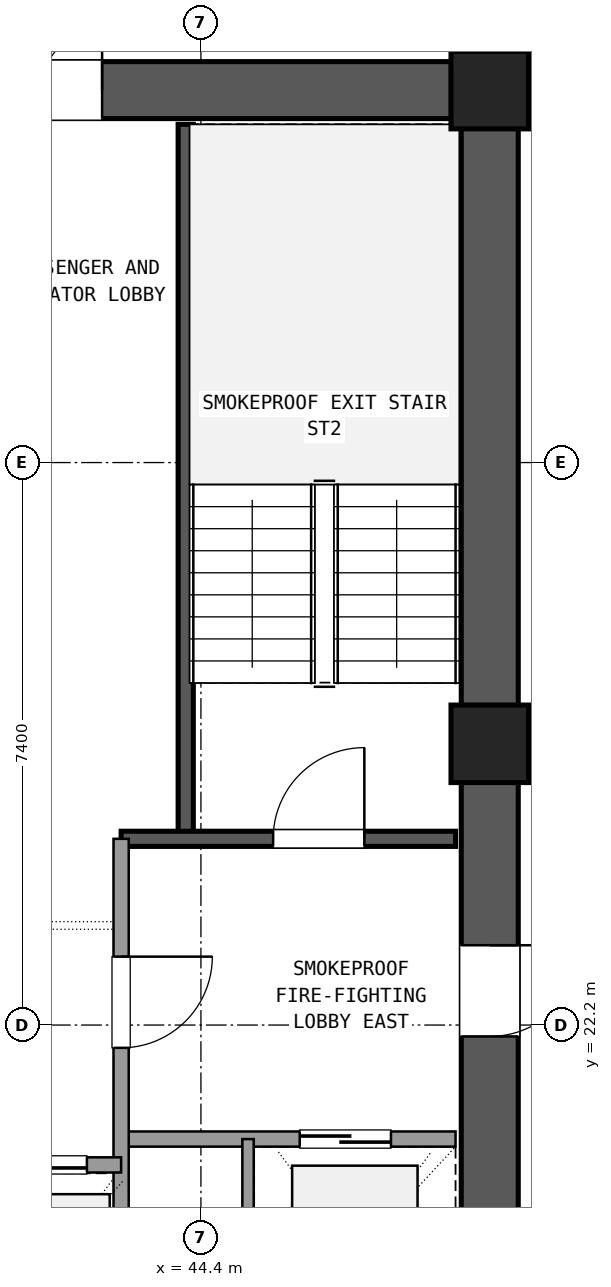
"""IFC4 building model, lengths in metres.
Left out: names, types, materials, properties, quantities, classifications, styles, units other than length and angle.
Written with IfcOpenShell. Run it as: python <this file> out.ifc"""

import sys

from ifc_helpers import new_model, si_unit, direction, frame, frame_2d, origin, origin_2d, place, context, subcontext, project, spatial, rectangle, extrude, element, fill, save


model = new_model("IFC4")
c1 = context("Model", 3, precision=1e-05, world=origin(), true_north=direction((0.0, 1.0)))
c2 = subcontext(c1, "Body", "Model", "MODEL_VIEW")
j1 = project(units=[si_unit("LENGTHUNIT", "METRE"), si_unit("PLANEANGLEUNIT", "RADIAN")], contexts=[c1])
p1 = place(None, origin())
s1 = spatial("IfcSite", under=j1, at=p1, CompositionType="ELEMENT")
p2 = place(p1, origin())
s2 = spatial("IfcBuilding", under=s1, at=p2, CompositionType="ELEMENT")
p3 = place(p2, frame((0.0, 0.0, 138.42)))
s3 = spatial("IfcBuildingStorey", under=s2, at=p3, CompositionType="ELEMENT", Elevation=138.42)
for number, where, z_axis, x_axis in (
    (1, (48.2, 25.9, 0.0), (0.0, 0.0, 1.0), (1.0, 0.0, 0.0)),
    (2, (48.2, 34.5, 0.0), (0.0, 0.0, 1.0), (1.0, 0.0, 0.0)),
):
    element("IfcColumn", number, at=place(p3, frame(where, z_axis=z_axis, x_axis=x_axis)), inside=s3, PredefinedType="COLUMN", context=c2, shape_type="SweptSolid", body=[
        extrude(rectangle(XDim=1.02, YDim=1.02, at=origin_2d()), origin(), (0.0, 0.0, 1.0), 3.6),
    ])
p4 = place(p3, frame((48.2, 17.805, 0.0), z_axis=(0.0, 0.0, 1.0), x_axis=(0.0, 1.0, 0.0)))
e3 = element("IfcWall", 3, at=p4, inside=s3, PredefinedType="SHEAR", context=c2, shape_type="SweptSolid", body=[
    extrude(rectangle(XDim=7.59, YDim=0.75, at=frame_2d((3.795, 0.0))), origin(), (0.0, 0.0, 1.0), 3.32),
])
p5 = place(p4, frame((4.245, 0.0, 0.0)))
e4 = element("IfcOpeningElement", 4, at=p5, cuts=e3, PredefinedType="OPENING", context=c2, shape_type="SweptSolid", body=[
    extrude(rectangle(XDim=1.2, YDim=2.15, at=frame_2d((0.6, 1.075))), frame((0.0, 0.385, 0.0), z_axis=(0.0, -1.0, 0.0), x_axis=(1.0, 0.0, 0.0)), (0.0, 0.0, 1.0), 0.77),
])
p6 = place(p3, frame((48.2, 26.405, 0.0), z_axis=(0.0, 0.0, 1.0), x_axis=(0.0, 1.0, 0.0)))
e5 = element("IfcWall", 5, at=p6, inside=s3, PredefinedType="SHEAR", context=c2, shape_type="SweptSolid", body=[
    extrude(rectangle(XDim=7.59, YDim=0.75, at=frame_2d((3.795, 0.0))), origin(), (0.0, 0.0, 1.0), 3.32),
])
p7 = place(p3, frame((47.695, 34.5, 0.0), z_axis=(0.0, 0.0, 1.0), x_axis=(-1.0, 0.0, 0.0)))
e6 = element("IfcWall", 6, at=p7, inside=s3, PredefinedType="SHEAR", context=c2, shape_type="SweptSolid", body=[
    extrude(rectangle(XDim=10.19, YDim=0.75, at=frame_2d((5.095, 0.0))), origin(), (0.0, 0.0, 1.0), 3.32),
])
p8 = place(p7, frame((4.595, 0.0, 0.0)))
e7 = element("IfcOpeningElement", 7, at=p8, cuts=e6, PredefinedType="OPENING", context=c2, shape_type="SweptSolid", body=[
    extrude(rectangle(XDim=1.6, YDim=2.2, at=frame_2d((0.8, 1.1))), frame((0.0, 0.385, 0.0), z_axis=(0.0, -1.0, 0.0), x_axis=(1.0, 0.0, 0.0)), (0.0, 0.0, 1.0), 0.77),
])
p9 = place(p3, frame((44.2, 24.65, 0.0), z_axis=(0.0, 0.0, 1.0), x_axis=(0.0, 1.0, 0.0)))
e8 = element("IfcWall", 8, at=p9, inside=s3, PredefinedType="SHEAR", context=c2, shape_type="SweptSolid", body=[
    extrude(rectangle(XDim=9.4, YDim=0.2, at=frame_2d((4.7, 0.0))), origin(), (0.0, 0.0, 1.0), 3.32),
])
p10 = place(p3, frame((43.35, 24.65, 0.0), z_axis=(0.0, 0.0, 1.0), x_axis=(1.0, 0.0, 0.0)))
e9 = element("IfcWall", 9, at=p10, inside=s3, PredefinedType="SHEAR", context=c2, shape_type="SweptSolid", body=[
    extrude(rectangle(XDim=4.4, YDim=0.2, at=frame_2d((2.2, 0.0))), origin(), (0.0, 0.0, 1.0), 3.32),
])
p11 = place(p10, frame((2.0, 0.0, 0.0)))
e10 = element("IfcOpeningElement", 10, at=p11, cuts=e9, PredefinedType="OPENING", context=c2, shape_type="SweptSolid", body=[
    extrude(rectangle(XDim=1.2, YDim=2.15, at=frame_2d((0.6, 1.075))), frame((0.0, 0.11, 0.0), z_axis=(0.0, -1.0, 0.0), x_axis=(1.0, 0.0, 0.0)), (0.0, 0.0, 1.0), 0.22),
])
p12 = place(p3, frame((43.35, 20.7, 0.0), z_axis=(0.0, 0.0, 1.0), x_axis=(1.0, 0.0, 0.0)))
e11 = element("IfcWall", 11, at=p12, inside=s3, PredefinedType="SOLIDWALL", context=c2, shape_type="SweptSolid", body=[
    extrude(rectangle(XDim=4.4, YDim=0.2, at=frame_2d((2.2, 0.0))), origin(), (0.0, 0.0, 1.0), 2.61),
])
p13 = place(p12, frame((2.35, 0.0, 0.0)))
e12 = element("IfcOpeningElement", 12, at=p13, cuts=e11, PredefinedType="OPENING", context=c2, shape_type="SweptSolid", body=[
    extrude(rectangle(XDim=1.2, YDim=2.15, at=frame_2d((0.6, 1.075))), frame((0.0, 0.11, 0.0), z_axis=(0.0, -1.0, 0.0), x_axis=(1.0, 0.0, 0.0)), (0.0, 0.0, 1.0), 0.22),
])
p14 = place(p3, frame((43.35, 17.75, 0.0), z_axis=(0.0, 0.0, 1.0), x_axis=(0.0, 1.0, 0.0)))
e13 = element("IfcWall", 13, at=p14, inside=s3, PredefinedType="SOLIDWALL", context=c2, shape_type="SweptSolid", body=[
    extrude(rectangle(XDim=6.9, YDim=0.2, at=frame_2d((3.45, 0.0))), origin(), (0.0, 0.0, 1.0), 2.61),
])
p15 = place(p14, frame((4.15, 0.0, 0.0)))
e14 = element("IfcOpeningElement", 14, at=p15, cuts=e13, PredefinedType="OPENING", context=c2, shape_type="SweptSolid", body=[
    extrude(rectangle(XDim=1.2, YDim=2.15, at=frame_2d((0.6, 1.075))), frame((0.0, 0.11, 0.0), z_axis=(0.0, -1.0, 0.0), x_axis=(1.0, 0.0, 0.0)), (0.0, 0.0, 1.0), 0.22),
])
p16 = place(p3, frame((45.02, 17.75, 0.0), z_axis=(0.0, 0.0, 1.0), x_axis=(0.0, 1.0, 0.0)))
e15 = element("IfcWall", 15, at=p16, inside=s3, PredefinedType="PARTITIONING", context=c2, shape_type="SweptSolid", body=[
    extrude(rectangle(XDim=2.95, YDim=0.15, at=frame_2d((1.475, 0.0))), origin(), (0.0, 0.0, 1.0), 2.61),
])
p17 = place(p3, frame((37.25, 20.36, 0.0), z_axis=(0.0, 0.0, 1.0), x_axis=(1.0, 0.0, 0.0)))
e16 = element("IfcWall", 16, at=p17, inside=s3, PredefinedType="SOLIDWALL", context=c2, shape_type="SweptSolid", body=[
    extrude(rectangle(XDim=6.1, YDim=0.2, at=frame_2d((3.05, 0.0))), origin(), (0.0, 0.0, 1.0), 2.61),
])
p18 = place(p17, frame((0.45, 0.0, 0.0)))
e17 = element("IfcOpeningElement", 17, at=p18, cuts=e16, PredefinedType="OPENING", context=c2, shape_type="SweptSolid", body=[
    extrude(rectangle(XDim=1.1, YDim=2.15, at=frame_2d((0.55, 1.075))), frame((0.0, 0.11, 0.0), z_axis=(0.0, -1.0, 0.0), x_axis=(1.0, 0.0, 0.0)), (0.0, 0.0, 1.0), 0.22),
])
p19 = place(p17, frame((2.5, 0.0, 0.0)))
e18 = element("IfcOpeningElement", 18, at=p19, cuts=e16, PredefinedType="OPENING", context=c2, shape_type="SweptSolid", body=[
    extrude(rectangle(XDim=1.1, YDim=2.15, at=frame_2d((0.55, 1.075))), frame((0.0, 0.11, 0.0), z_axis=(0.0, -1.0, 0.0), x_axis=(1.0, 0.0, 0.0)), (0.0, 0.0, 1.0), 0.22),
])
p20 = place(p17, frame((4.55, 0.0, 0.0)))
e19 = element("IfcOpeningElement", 19, at=p20, cuts=e16, PredefinedType="OPENING", context=c2, shape_type="SweptSolid", body=[
    extrude(rectangle(XDim=1.1, YDim=2.15, at=frame_2d((0.55, 1.075))), frame((0.0, 0.11, 0.0), z_axis=(0.0, -1.0, 0.0), x_axis=(1.0, 0.0, 0.0)), (0.0, 0.0, 1.0), 0.22),
])
p21 = place(p11, origin())
e20 = element("IfcDoor", 20, at=p21, inside=s3, OperationType="SINGLE_SWING_RIGHT", PredefinedType="DOOR", context=c2, shape_type="SweptSolid", body=[
    extrude(rectangle(XDim=1.2, YDim=2.15, at=frame_2d((0.6, 1.075))), frame((0.0, 0.025, 0.0), z_axis=(0.0, -1.0, 0.0), x_axis=(1.0, 0.0, 0.0)), (0.0, 0.0, 1.0), 0.05),
])
fill(e10, e20)
p22 = place(p13, origin())
e21 = element("IfcDoor", 21, at=p22, inside=s3, OperationType="SLIDING_TO_RIGHT", PredefinedType="DOOR", context=c2, shape_type="SweptSolid", body=[
    extrude(rectangle(XDim=1.2, YDim=2.15, at=frame_2d((0.6, 1.075))), frame((0.0, 0.025, 0.0), z_axis=(0.0, -1.0, 0.0), x_axis=(1.0, 0.0, 0.0)), (0.0, 0.0, 1.0), 0.05),
])
fill(e12, e21)
p23 = place(p15, frame((1.2, 0.0, 0.0), z_axis=(0.0, 0.0, 1.0), x_axis=(-1.0, 0.0, 0.0)))
e22 = element("IfcDoor", 22, at=p23, inside=s3, OperationType="SINGLE_SWING_RIGHT", PredefinedType="DOOR", context=c2, shape_type="SweptSolid", body=[
    extrude(rectangle(XDim=1.2, YDim=2.15, at=frame_2d((0.6, 1.075))), frame((0.0, 0.025, 0.0), z_axis=(0.0, -1.0, 0.0), x_axis=(1.0, 0.0, 0.0)), (0.0, 0.0, 1.0), 0.05),
])
fill(e14, e22)
p24 = place(p5, frame((1.2, 0.0, 0.0), z_axis=(0.0, 0.0, 1.0), x_axis=(-1.0, 0.0, 0.0)))
e23 = element("IfcDoor", 23, at=p24, inside=s3, OperationType="SINGLE_SWING_RIGHT", PredefinedType="DOOR", context=c2, shape_type="SweptSolid", body=[
    extrude(rectangle(XDim=1.2, YDim=2.15, at=frame_2d((0.6, 1.075))), frame((0.0, 0.025, 0.0), z_axis=(0.0, -1.0, 0.0), x_axis=(1.0, 0.0, 0.0)), (0.0, 0.0, 1.0), 0.05),
])
fill(e4, e23)
p25 = place(p8, frame((1.6, 0.0, 0.0), z_axis=(0.0, 0.0, 1.0), x_axis=(-1.0, 0.0, 0.0)))
e24 = element("IfcDoor", 24, at=p25, inside=s3, OperationType="DOUBLE_DOOR_SINGLE_SWING", PredefinedType="DOOR", context=c2, shape_type="SweptSolid", body=[
    extrude(rectangle(XDim=1.6, YDim=2.2, at=frame_2d((0.8, 1.1))), frame((0.0, 0.025, 0.0), z_axis=(0.0, -1.0, 0.0), x_axis=(1.0, 0.0, 0.0)), (0.0, 0.0, 1.0), 0.05),
])
fill(e7, e24)
p26 = place(p20, origin())
e25 = element("IfcDoor", 25, at=p26, inside=s3, OperationType="SLIDING_TO_LEFT", PredefinedType="DOOR", context=c2, shape_type="SweptSolid", body=[
    extrude(rectangle(XDim=1.1, YDim=2.15, at=frame_2d((0.55, 1.075))), frame((0.0, 0.025, 0.0), z_axis=(0.0, -1.0, 0.0), x_axis=(1.0, 0.0, 0.0)), (0.0, 0.0, 1.0), 0.05),
])
fill(e19, e25)
save(model, sys.argv[1])
